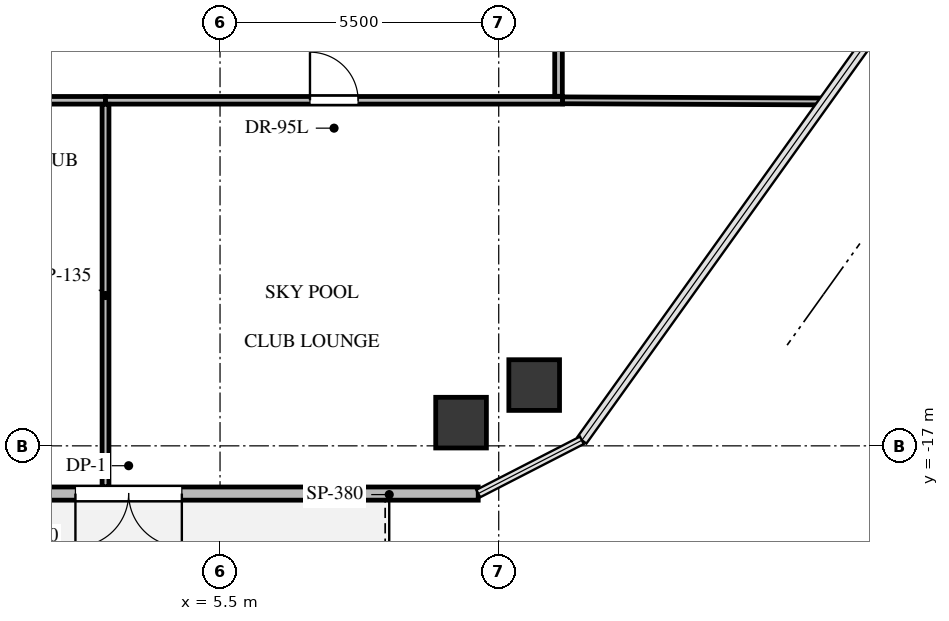
"""IFC4 building model, lengths in metres.
Left out: names, types, materials, properties, quantities, classifications, styles, units other than length and angle.
Written with IfcOpenShell. Run it as: python <this file> out.ifc"""

import sys

from ifc_helpers import new_model, si_unit, direction, frame, frame_2d, origin, origin_2d, place, context, subcontext, project, spatial, rectangle, extrude, source, transform, mapped, element, fill, save


model = new_model("IFC4")
c1 = context("Model", 3, precision=1e-05, world=origin(), true_north=direction((0.0, 1.0)))
c2 = subcontext(c1, "Body", "Model", "MODEL_VIEW")
j1 = project(units=[si_unit("LENGTHUNIT", "METRE"), si_unit("PLANEANGLEUNIT", "RADIAN")], contexts=[c1])
p1 = place(None, origin())
s1 = spatial("IfcSite", under=j1, at=p1, CompositionType="ELEMENT")
p2 = place(p1, origin())
s2 = spatial("IfcBuilding", under=s1, at=p2, CompositionType="ELEMENT")
p3 = place(p2, frame((0.0, 0.0, 162.6)))
s3 = spatial("IfcBuildingStorey", under=s2, at=p3, CompositionType="ELEMENT", Elevation=162.6)
m1 = source(origin(), c2, "Body", "SweptSolid", [
    extrude(rectangle(XDim=1.0, YDim=1.0, at=origin_2d()), origin(), (0.0, 0.0, 1.0), 4.68),
])
for number, where, z_axis, x_axis in (
    (1, (11.7, -15.8, -0.32), (0.0, 0.0, 1.0), (1.0, 0.0, 0.0)),
    (2, (10.257, -16.542, -0.32), (0.0, 0.0, 1.0), (1.0, 0.0, 0.0)),
):
    element("IfcColumn", number, at=place(p3, frame(where, z_axis=z_axis, x_axis=x_axis)), inside=s3, PredefinedType="COLUMN", context=c2, shape_type="MappedRepresentation", body=[
        mapped(m1, transform((0.0, 0.0, 0.0), x_axis=(1.0, 0.0, 0.0), y_axis=(0.0, 1.0, 0.0), z_axis=(0.0, 0.0, 1.0), scale=1.0)),
    ])
p4 = place(p3, frame((10.595, -17.942, 0.0), z_axis=(0.0, 0.0, 1.0), x_axis=(-1.0, 0.0, 0.0)))
e3 = element("IfcWall", 3, at=p4, inside=s3, PredefinedType="SOLIDWALL", context=c2, shape_type="SweptSolid", body=[
    extrude(rectangle(XDim=18.499, YDim=0.26, at=frame_2d((9.249, 0.0))), origin(), (0.0, 0.0, 1.0), 4.36),
])
p5 = place(p4, frame((5.849, 0.0, 0.0)))
e4 = element("IfcOpeningElement", 4, at=p5, cuts=e3, PredefinedType="OPENING", context=c2, shape_type="SweptSolid", body=[
    extrude(rectangle(XDim=2.1, YDim=2.4, at=frame_2d((1.05, 1.2))), frame((0.0, 0.14, 0.0), z_axis=(0.0, -1.0, 0.0), x_axis=(1.0, 0.0, 0.0)), (0.0, 0.0, 1.0), 0.28),
])
p6 = place(p4, frame((11.599, 0.0, 0.0)))
e5 = element("IfcOpeningElement", 5, at=p6, cuts=e3, PredefinedType="OPENING", context=c2, shape_type="SweptSolid", body=[
    extrude(rectangle(XDim=2.1, YDim=2.4, at=frame_2d((1.05, 1.2))), frame((0.0, 0.14, 0.0), z_axis=(0.0, -1.0, 0.0), x_axis=(1.0, 0.0, 0.0)), (0.0, 0.0, 1.0), 0.28),
])
p7 = place(p3, frame((1.089, -10.18, 0.0), z_axis=(0.0, 0.0, 1.0), x_axis=(1.0, 0.0, 0.0)))
e6 = element("IfcWall", 6, at=p7, inside=s3, PredefinedType="PARTITIONING", context=c2, shape_type="SweptSolid", body=[
    extrude(rectangle(XDim=2.151, YDim=0.15, at=frame_2d((1.075, 0.0))), origin(), (0.0, 0.0, 1.0), 3.908),
])
p8 = place(p3, frame((3.24, -10.18, 0.0), z_axis=(0.0, 0.0, 1.0), x_axis=(1.0, 0.0, 0.0)))
e7 = element("IfcWall", 7, at=p8, inside=s3, PredefinedType="PARTITIONING", context=c2, shape_type="SweptSolid", body=[
    extrude(rectangle(XDim=9.02, YDim=0.15, at=frame_2d((4.51, 0.0))), origin(), (0.0, 0.0, 1.0), 3.542),
])
p9 = place(p8, frame((4.035, 0.0, 0.0)))
e8 = element("IfcOpeningElement", 8, at=p9, cuts=e7, PredefinedType="OPENING", context=c2, shape_type="SweptSolid", body=[
    extrude(rectangle(XDim=0.95, YDim=2.1, at=frame_2d((0.475, 1.05))), frame((0.0, 0.085, 0.0), z_axis=(0.0, -1.0, 0.0), x_axis=(1.0, 0.0, 0.0)), (0.0, 0.0, 1.0), 0.17),
])
p10 = place(p3, frame((12.18, -10.101, 0.0), z_axis=(0.0, 0.0, 1.0), x_axis=(0.0, 1.0, 0.0)))
e9 = element("IfcWall", 9, at=p10, inside=s3, PredefinedType="PARTITIONING", context=c2, shape_type="SweptSolid", body=[
    extrude(rectangle(XDim=1.661, YDim=0.15, at=frame_2d((0.831, 0.0))), origin(), (0.0, 0.0, 1.0), 4.345),
])
p11 = place(p3, frame((3.24, -10.259, 0.0), z_axis=(0.0, 0.0, 1.0), x_axis=(0.0, -1.0, 0.0)))
e10 = element("IfcWall", 10, at=p11, inside=s3, PredefinedType="PARTITIONING", context=c2, shape_type="SweptSolid", body=[
    extrude(rectangle(XDim=7.548, YDim=0.135, at=frame_2d((3.774, 0.0))), origin(), (0.0, 0.0, 1.0), 3.699),
])
p12 = place(p3, frame((12.26, -10.18, 0.0), z_axis=(0.0, 0.0, 1.0), x_axis=(0.999990144117, -0.004439782427, 0.0)))
e11 = element("IfcWall", 11, at=p12, inside=s3, PredefinedType="PARTITIONING", context=c2, shape_type="SweptSolid", body=[
    extrude(rectangle(XDim=5.169, YDim=0.135, at=frame_2d((2.584, 0.0))), origin(), (0.0, 0.0, 1.0), 3.699),
])
m2 = source(origin(), c2, "Body", "SweptSolid", [
    extrude(rectangle(XDim=2.1, YDim=2.4, at=frame_2d((1.05, 1.2))), frame((0.0, 0.025, 0.0), z_axis=(0.0, -1.0, 0.0), x_axis=(1.0, 0.0, 0.0)), (0.0, 0.0, 1.0), 0.05),
])
p13 = place(p5, origin())
e12 = element("IfcDoor", 12, at=p13, inside=s3, OperationType="DOUBLE_DOOR_SINGLE_SWING", PredefinedType="DOOR", context=c2, shape_type="MappedRepresentation", body=[
    mapped(m2, transform((0.0, 0.0, 0.0), x_axis=(1.0, 0.0, 0.0), y_axis=(0.0, 1.0, 0.0), z_axis=(0.0, 0.0, 1.0), scale=1.0)),
])
fill(e4, e12)
m3 = source(origin(), c2, "Body", "SweptSolid", [
    extrude(rectangle(XDim=0.95, YDim=2.1, at=frame_2d((0.475, 1.05))), frame((0.0, 0.025, 0.0), z_axis=(0.0, -1.0, 0.0), x_axis=(1.0, 0.0, 0.0)), (0.0, 0.0, 1.0), 0.05),
])
p14 = place(p9, origin())
e13 = element("IfcDoor", 13, at=p14, inside=s3, OperationType="SINGLE_SWING_LEFT", PredefinedType="DOOR", context=c2, shape_type="MappedRepresentation", body=[
    mapped(m3, transform((0.0, 0.0, 0.0), x_axis=(1.0, 0.0, 0.0), y_axis=(0.0, 1.0, 0.0), z_axis=(0.0, 0.0, 1.0), scale=1.0)),
])
fill(e8, e13)
save(model, sys.argv[1])
